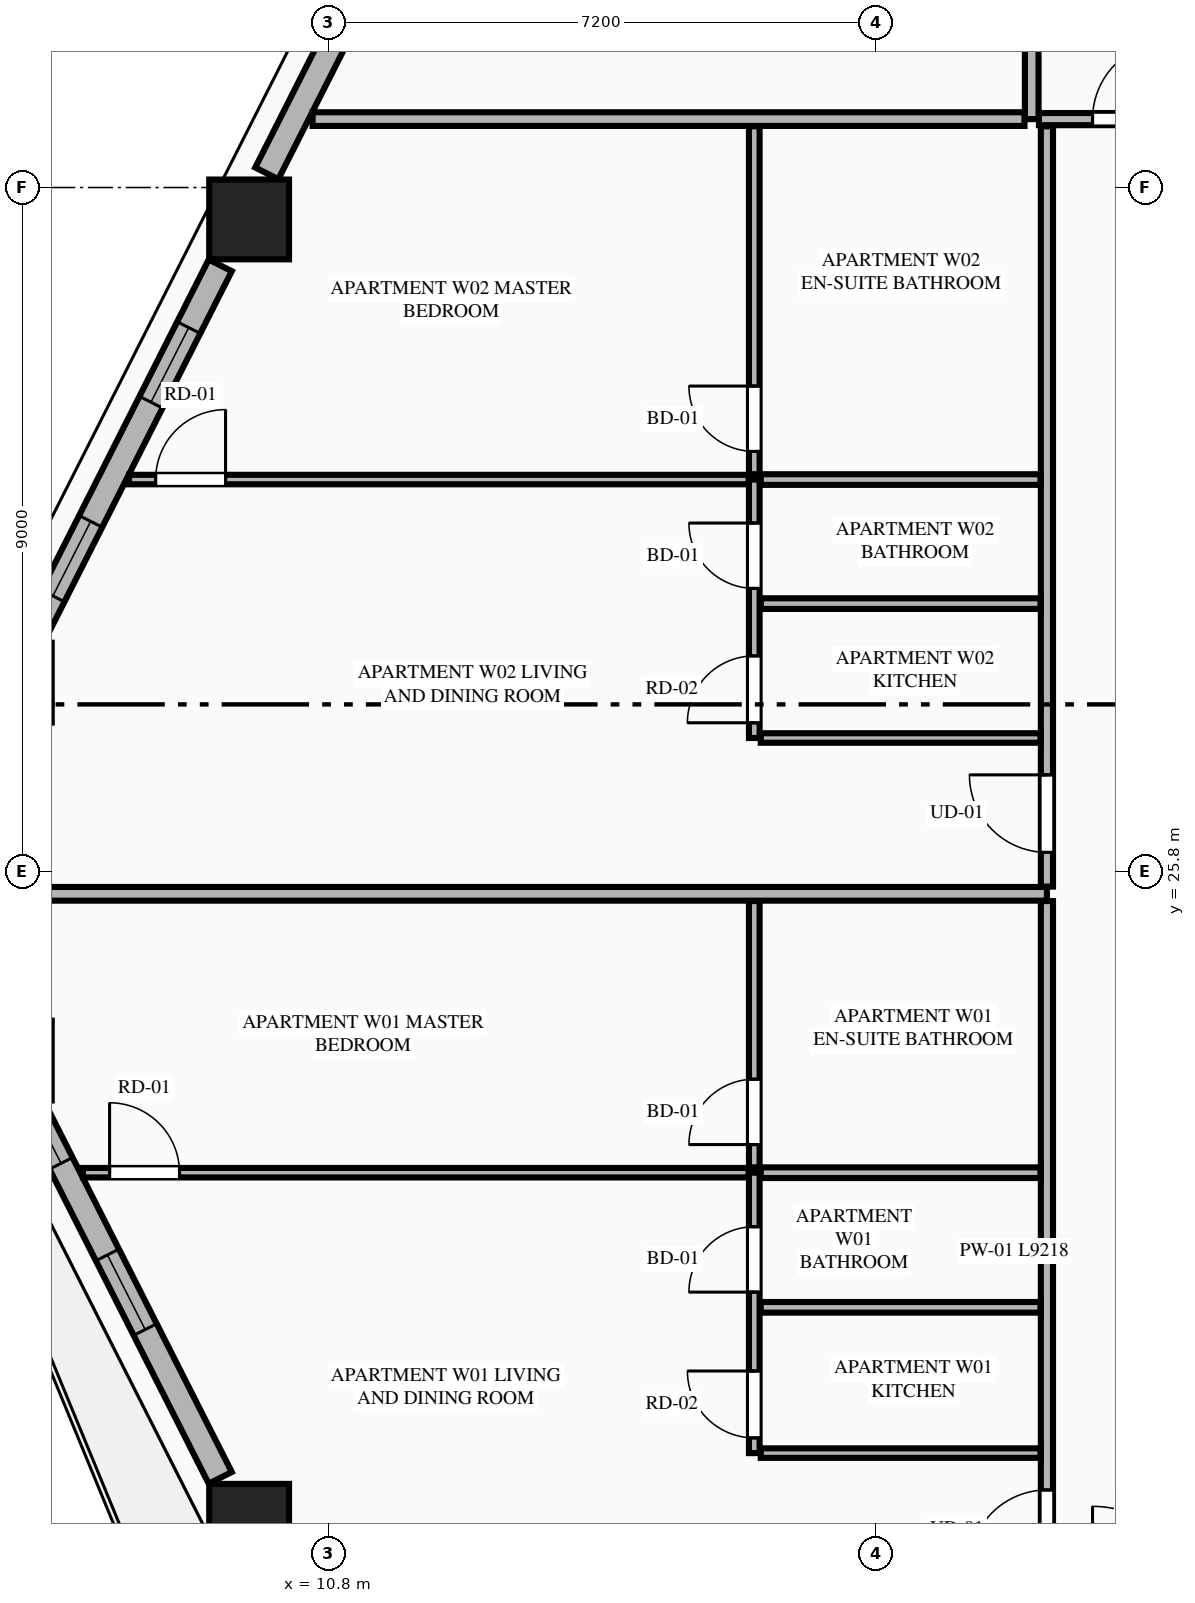
"""IFC4 building model, lengths in metres.
Left out: names, types, materials, properties, quantities, classifications, styles, units other than length and angle.
Written with IfcOpenShell. Run it as: python <this file> out.ifc"""

import sys

from ifc_helpers import new_model, si_unit, direction, frame, frame_2d, origin, origin_2d, place, context, subcontext, project, spatial, rectangle, extrude, element, fill, save


model = new_model("IFC4")
c1 = context("Model", 3, precision=1e-05, world=origin(), true_north=direction((0.0, 1.0)))
c2 = subcontext(c1, "Body", "Model", "MODEL_VIEW")
j1 = project(units=[si_unit("LENGTHUNIT", "METRE"), si_unit("PLANEANGLEUNIT", "RADIAN")], contexts=[c1])
p1 = place(None, origin())
s1 = spatial("IfcSite", under=j1, at=p1, CompositionType="ELEMENT")
p2 = place(p1, origin())
s2 = spatial("IfcBuilding", under=s1, at=p2, CompositionType="ELEMENT")
p3 = place(p2, frame((0.0, 0.0, 87.1)))
s3 = spatial("IfcBuildingStorey", under=s2, at=p3, CompositionType="ELEMENT", Elevation=87.1)
for number, where, z_axis, x_axis in (
    (1, (9.754, 34.38, 0.0), (0.0, 0.0, 1.0), (1.0, 0.0, 0.0)),
    (2, (9.754, 17.22, 0.0), (0.0, 0.0, 1.0), (1.0, 0.0, 0.0)),
):
    element("IfcColumn", number, at=place(p3, frame(where, z_axis=z_axis, x_axis=x_axis)), inside=s3, PredefinedType="COLUMN", context=c2, shape_type="SweptSolid", body=[
        extrude(rectangle(XDim=1.05, YDim=1.05, at=origin_2d()), origin(), (0.0, 0.0, 1.0), 3.55),
    ])
p4 = place(p3, frame((12.567, 40.085, 0.0), z_axis=(0.0, 0.0, 1.0), x_axis=(-0.451599886425, -0.892220568347, 0.0)))
e3 = element("IfcWall", 3, at=p4, inside=s3, PredefinedType="STANDARD", context=c2, shape_type="SweptSolid", body=[
    extrude(rectangle(XDim=5.715, YDim=0.34, at=frame_2d((2.857, 0.0))), origin(), (0.0, 0.0, 1.0), 2.787),
])
p5 = place(p4, frame((2.308, 0.0, 0.75)))
e4 = element("IfcOpeningElement", 4, at=p5, cuts=e3, PredefinedType="OPENING", context=c2, shape_type="SweptSolid", body=[
    extrude(rectangle(XDim=1.1, YDim=1.887, at=frame_2d((0.55, 0.943))), frame((0.0, 0.18, 0.0), z_axis=(0.0, -1.0, 0.0), x_axis=(1.0, 0.0, 0.0)), (0.0, 0.0, 1.0), 0.36),
])
p6 = place(p3, frame((9.374, 33.776, 0.0), z_axis=(0.0, 0.0, 1.0), x_axis=(-0.451597066012, -0.892221995901, 0.0)))
e5 = element("IfcWall", 5, at=p6, inside=s3, PredefinedType="STANDARD", context=c2, shape_type="SweptSolid", body=[
    extrude(rectangle(XDim=5.474, YDim=0.34, at=frame_2d((2.737, 0.0))), origin(), (0.0, 0.0, 1.0), 2.787),
])
p7 = place(p6, frame((0.918, 0.0, 0.75)))
e6 = element("IfcOpeningElement", 6, at=p7, cuts=e5, PredefinedType="OPENING", context=c2, shape_type="SweptSolid", body=[
    extrude(rectangle(XDim=1.1, YDim=1.887, at=frame_2d((0.55, 0.943))), frame((0.0, 0.18, 0.0), z_axis=(0.0, -1.0, 0.0), x_axis=(1.0, 0.0, 0.0)), (0.0, 0.0, 1.0), 0.36),
])
p8 = place(p6, frame((3.775, 0.0, 0.75)))
e7 = element("IfcOpeningElement", 7, at=p8, cuts=e5, PredefinedType="OPENING", context=c2, shape_type="SweptSolid", body=[
    extrude(rectangle(XDim=1.1, YDim=1.887, at=frame_2d((0.55, 0.943))), frame((0.0, 0.18, 0.0), z_axis=(0.0, -1.0, 0.0), x_axis=(1.0, 0.0, 0.0)), (0.0, 0.0, 1.0), 0.36),
])
p9 = place(p3, frame((6.902, 22.708, 0.0), z_axis=(0.0, 0.0, 1.0), x_axis=(0.451579095309, -0.892231091523, 0.0)))
e8 = element("IfcWall", 8, at=p9, inside=s3, PredefinedType="STANDARD", context=c2, shape_type="SweptSolid", body=[
    extrude(rectangle(XDim=5.474, YDim=0.34, at=frame_2d((2.737, 0.0))), origin(), (0.0, 0.0, 1.0), 2.787),
])
p10 = place(p9, frame((2.187, 0.0, 0.75)))
e9 = element("IfcOpeningElement", 9, at=p10, cuts=e8, PredefinedType="OPENING", context=c2, shape_type="SweptSolid", body=[
    extrude(rectangle(XDim=1.1, YDim=1.887, at=frame_2d((0.55, 0.943))), frame((0.0, 0.18, 0.0), z_axis=(0.0, -1.0, 0.0), x_axis=(1.0, 0.0, 0.0)), (0.0, 0.0, 1.0), 0.36),
])
p11 = place(p9, frame((0.21, 0.0, 0.75)))
e10 = element("IfcOpeningElement", 10, at=p11, cuts=e8, PredefinedType="OPENING", context=c2, shape_type="SweptSolid", body=[
    extrude(rectangle(XDim=0.626, YDim=1.887, at=frame_2d((0.313, 0.943))), frame((0.0, 0.18, 0.0), z_axis=(0.0, -1.0, 0.0), x_axis=(1.0, 0.0, 0.0)), (0.0, 0.0, 1.0), 0.36),
])
p12 = place(p3, frame((20.05, 35.7, 0.0), z_axis=(0.0, 0.0, 1.0), x_axis=(0.0, 1.0, 0.0)))
e11 = element("IfcWall", 11, at=p12, inside=s3, PredefinedType="PARTITIONING", context=c2, shape_type="SweptSolid", body=[
    extrude(rectangle(XDim=13.445, YDim=0.18, at=frame_2d((6.723, 0.0))), origin(), (0.0, 0.0, 1.0), 3.33),
])
p13 = place(p3, frame((20.145, 35.7, 0.0), z_axis=(0.0, 0.0, 1.0), x_axis=(1.0, 0.0, 0.0)))
e12 = element("IfcWall", 12, at=p13, inside=s3, PredefinedType="PARTITIONING", context=c2, shape_type="SweptSolid", body=[
    extrude(rectangle(XDim=24.51, YDim=0.16, at=frame_2d((12.255, 0.0))), origin(), (0.0, 0.0, 1.0), 3.33),
])
p14 = place(p13, frame((0.705, 0.0, 0.0)))
e13 = element("IfcOpeningElement", 13, at=p14, cuts=e12, PredefinedType="OPENING", context=c2, shape_type="SweptSolid", body=[
    extrude(rectangle(XDim=1.02, YDim=2.25, at=frame_2d((0.51, 1.125))), frame((0.0, 0.09, 0.0), z_axis=(0.0, -1.0, 0.0), x_axis=(1.0, 0.0, 0.0)), (0.0, 0.0, 1.0), 0.18),
])
p15 = place(p3, frame((10.589, 35.7, 0.0), z_axis=(0.0, 0.0, 1.0), x_axis=(1.0, 0.0, 0.0)))
e14 = element("IfcWall", 14, at=p15, inside=s3, PredefinedType="PARTITIONING", context=c2, shape_type="SweptSolid", body=[
    extrude(rectangle(XDim=9.366, YDim=0.18, at=frame_2d((4.683, 0.0))), origin(), (0.0, 0.0, 1.0), 3.33),
])
p16 = place(p3, frame((20.25, 16.195, 0.0), z_axis=(0.0, 0.0, 1.0), x_axis=(0.0, 1.0, 0.0)))
e15 = element("IfcWall", 15, at=p16, inside=s3, PredefinedType="PARTITIONING", context=c2, shape_type="SweptSolid", body=[
    extrude(rectangle(XDim=9.218, YDim=0.16, at=frame_2d((4.609, 0.0))), origin(), (0.0, 0.0, 1.0), 2.7),
])
p17 = place(p16, frame((0.45, 0.0, 0.0)))
e16 = element("IfcOpeningElement", 16, at=p17, cuts=e15, PredefinedType="OPENING", context=c2, shape_type="SweptSolid", body=[
    extrude(rectangle(XDim=1.02, YDim=2.25, at=frame_2d((0.51, 1.125))), frame((0.0, 0.09, 0.0), z_axis=(0.0, -1.0, 0.0), x_axis=(1.0, 0.0, 0.0)), (0.0, 0.0, 1.0), 0.18),
])
p18 = place(p3, frame((16.485, 18.15, 0.0), z_axis=(0.0, 0.0, 1.0), x_axis=(1.0, 0.0, 0.0)))
e17 = element("IfcWall", 17, at=p18, inside=s3, PredefinedType="PARTITIONING", context=c2, shape_type="SweptSolid", body=[
    extrude(rectangle(XDim=3.68, YDim=0.125, at=frame_2d((1.84, 0.0))), origin(), (0.0, 0.0, 1.0), 2.7),
])
p19 = place(p3, frame((16.4, 18.15, 0.0), z_axis=(0.0, 0.0, 1.0), x_axis=(0.0, 1.0, 0.0)))
e18 = element("IfcWall", 18, at=p19, inside=s3, PredefinedType="PLUMBINGWALL", context=c2, shape_type="SweptSolid", body=[
    extrude(rectangle(XDim=3.689, YDim=0.14, at=frame_2d((1.845, 0.0))), origin(), (0.0, 0.0, 1.0), 3.33),
])
p20 = place(p19, frame((0.2, 0.0, 0.0)))
e19 = element("IfcOpeningElement", 19, at=p20, cuts=e18, PredefinedType="OPENING", context=c2, shape_type="SweptSolid", body=[
    extrude(rectangle(XDim=0.88, YDim=2.15, at=frame_2d((0.44, 1.075))), frame((0.0, 0.08, 0.0), z_axis=(0.0, -1.0, 0.0), x_axis=(1.0, 0.0, 0.0)), (0.0, 0.0, 1.0), 0.16),
])
p21 = place(p19, frame((2.118, 0.0, 0.0)))
e20 = element("IfcOpeningElement", 20, at=p21, cuts=e18, PredefinedType="OPENING", context=c2, shape_type="SweptSolid", body=[
    extrude(rectangle(XDim=0.86, YDim=2.1, at=frame_2d((0.43, 1.05))), frame((0.0, 0.08, 0.0), z_axis=(0.0, -1.0, 0.0), x_axis=(1.0, 0.0, 0.0)), (0.0, 0.0, 1.0), 0.16),
])
p22 = place(p3, frame((16.4, 21.909, 0.0), z_axis=(0.0, 0.0, 1.0), x_axis=(0.0, 1.0, 0.0)))
e21 = element("IfcWall", 21, at=p22, inside=s3, PredefinedType="PLUMBINGWALL", context=c2, shape_type="SweptSolid", body=[
    extrude(rectangle(XDim=3.504, YDim=0.14, at=frame_2d((1.752, 0.0))), origin(), (0.0, 0.0, 1.0), 3.33),
])
p23 = place(p22, frame((0.3, 0.0, 0.0)))
e22 = element("IfcOpeningElement", 22, at=p23, cuts=e21, PredefinedType="OPENING", context=c2, shape_type="SweptSolid", body=[
    extrude(rectangle(XDim=0.86, YDim=2.1, at=frame_2d((0.43, 1.05))), frame((0.0, 0.08, 0.0), z_axis=(0.0, -1.0, 0.0), x_axis=(1.0, 0.0, 0.0)), (0.0, 0.0, 1.0), 0.16),
])
p24 = place(p3, frame((16.485, 21.839, 0.0), z_axis=(0.0, 0.0, 1.0), x_axis=(1.0, 0.0, 0.0)))
e23 = element("IfcWall", 23, at=p24, inside=s3, PredefinedType="PLUMBINGWALL", context=c2, shape_type="SweptSolid", body=[
    extrude(rectangle(XDim=3.68, YDim=0.14, at=frame_2d((1.84, 0.0))), origin(), (0.0, 0.0, 1.0), 3.33),
])
p25 = place(p3, frame((7.568, 21.839, 0.0), z_axis=(0.0, 0.0, 1.0), x_axis=(1.0, 0.0, 0.0)))
e24 = element("IfcWall", 24, at=p25, inside=s3, PredefinedType="PARTITIONING", context=c2, shape_type="SweptSolid", body=[
    extrude(rectangle(XDim=8.757, YDim=0.125, at=frame_2d((4.378, 0.0))), origin(), (0.0, 0.0, 1.0), 3.33),
])
p26 = place(p25, frame((0.35, 0.0, 0.0)))
e25 = element("IfcOpeningElement", 25, at=p26, cuts=e24, PredefinedType="OPENING", context=c2, shape_type="SweptSolid", body=[
    extrude(rectangle(XDim=0.92, YDim=2.15, at=frame_2d((0.46, 1.075))), frame((0.0, 0.073, 0.0), z_axis=(0.0, -1.0, 0.0), x_axis=(1.0, 0.0, 0.0)), (0.0, 0.0, 1.0), 0.145),
])
p27 = place(p3, frame((16.485, 20.068, 0.0), z_axis=(0.0, 0.0, 1.0), x_axis=(1.0, 0.0, 0.0)))
e26 = element("IfcWall", 26, at=p27, inside=s3, PredefinedType="PLUMBINGWALL", context=c2, shape_type="SweptSolid", body=[
    extrude(rectangle(XDim=3.68, YDim=0.14, at=frame_2d((1.84, 0.0))), origin(), (0.0, 0.0, 1.0), 3.33),
])
p28 = place(p3, frame((6.087, 25.508, 0.0), z_axis=(0.0, 0.0, 1.0), x_axis=(1.0, 0.0, 0.0)))
e27 = element("IfcWall", 27, at=p28, inside=s3, PredefinedType="PARTITIONING", context=c2, shape_type="SweptSolid", body=[
    extrude(rectangle(XDim=14.163, YDim=0.18, at=frame_2d((7.082, 0.0))), origin(), (0.0, 0.0, 1.0), 3.33),
])
p29 = place(p3, frame((20.25, 25.603, 0.0), z_axis=(0.0, 0.0, 1.0), x_axis=(0.0, 1.0, 0.0)))
e28 = element("IfcWall", 28, at=p29, inside=s3, PredefinedType="PARTITIONING", context=c2, shape_type="SweptSolid", body=[
    extrude(rectangle(XDim=10.002, YDim=0.16, at=frame_2d((5.001, 0.0))), origin(), (0.0, 0.0, 1.0), 2.7),
])
p30 = place(p29, frame((0.45, 0.0, 0.0)))
e29 = element("IfcOpeningElement", 29, at=p30, cuts=e28, PredefinedType="OPENING", context=c2, shape_type="SweptSolid", body=[
    extrude(rectangle(XDim=1.02, YDim=2.25, at=frame_2d((0.51, 1.125))), frame((0.0, 0.09, 0.0), z_axis=(0.0, -1.0, 0.0), x_axis=(1.0, 0.0, 0.0)), (0.0, 0.0, 1.0), 0.18),
])
p31 = place(p3, frame((16.485, 27.558, 0.0), z_axis=(0.0, 0.0, 1.0), x_axis=(1.0, 0.0, 0.0)))
e30 = element("IfcWall", 30, at=p31, inside=s3, PredefinedType="PARTITIONING", context=c2, shape_type="SweptSolid", body=[
    extrude(rectangle(XDim=3.68, YDim=0.125, at=frame_2d((1.84, 0.0))), origin(), (0.0, 0.0, 1.0), 3.33),
])
p32 = place(p3, frame((16.4, 27.558, 0.0), z_axis=(0.0, 0.0, 1.0), x_axis=(0.0, 1.0, 0.0)))
e31 = element("IfcWall", 31, at=p32, inside=s3, PredefinedType="PLUMBINGWALL", context=c2, shape_type="SweptSolid", body=[
    extrude(rectangle(XDim=3.4, YDim=0.14, at=frame_2d((1.7, 0.0))), origin(), (0.0, 0.0, 1.0), 3.33),
])
p33 = place(p32, frame((0.2, 0.0, 0.0)))
e32 = element("IfcOpeningElement", 32, at=p33, cuts=e31, PredefinedType="OPENING", context=c2, shape_type="SweptSolid", body=[
    extrude(rectangle(XDim=0.88, YDim=2.15, at=frame_2d((0.44, 1.075))), frame((0.0, 0.08, 0.0), z_axis=(0.0, -1.0, 0.0), x_axis=(1.0, 0.0, 0.0)), (0.0, 0.0, 1.0), 0.16),
])
p34 = place(p32, frame((1.968, 0.0, 0.0)))
e33 = element("IfcOpeningElement", 33, at=p34, cuts=e31, PredefinedType="OPENING", context=c2, shape_type="SweptSolid", body=[
    extrude(rectangle(XDim=0.86, YDim=2.1, at=frame_2d((0.43, 1.05))), frame((0.0, 0.08, 0.0), z_axis=(0.0, -1.0, 0.0), x_axis=(1.0, 0.0, 0.0)), (0.0, 0.0, 1.0), 0.16),
])
p35 = place(p3, frame((16.4, 31.028, 0.0), z_axis=(0.0, 0.0, 1.0), x_axis=(0.0, 1.0, 0.0)))
e34 = element("IfcWall", 34, at=p35, inside=s3, PredefinedType="PLUMBINGWALL", context=c2, shape_type="SweptSolid", body=[
    extrude(rectangle(XDim=4.577, YDim=0.14, at=frame_2d((2.289, 0.0))), origin(), (0.0, 0.0, 1.0), 3.33),
])
p36 = place(p35, frame((0.3, 0.0, 0.0)))
e35 = element("IfcOpeningElement", 35, at=p36, cuts=e34, PredefinedType="OPENING", context=c2, shape_type="SweptSolid", body=[
    extrude(rectangle(XDim=0.86, YDim=2.1, at=frame_2d((0.43, 1.05))), frame((0.0, 0.08, 0.0), z_axis=(0.0, -1.0, 0.0), x_axis=(1.0, 0.0, 0.0)), (0.0, 0.0, 1.0), 0.16),
])
p37 = place(p3, frame((16.485, 30.958, 0.0), z_axis=(0.0, 0.0, 1.0), x_axis=(1.0, 0.0, 0.0)))
e36 = element("IfcWall", 36, at=p37, inside=s3, PredefinedType="PLUMBINGWALL", context=c2, shape_type="SweptSolid", body=[
    extrude(rectangle(XDim=3.68, YDim=0.14, at=frame_2d((1.84, 0.0))), origin(), (0.0, 0.0, 1.0), 3.33),
])
p38 = place(p3, frame((8.174, 30.958, 0.0), z_axis=(0.0, 0.0, 1.0), x_axis=(1.0, 0.0, 0.0)))
e37 = element("IfcWall", 37, at=p38, inside=s3, PredefinedType="PARTITIONING", context=c2, shape_type="SweptSolid", body=[
    extrude(rectangle(XDim=8.151, YDim=0.125, at=frame_2d((4.075, 0.0))), origin(), (0.0, 0.0, 1.0), 3.33),
])
p39 = place(p38, frame((0.35, 0.0, 0.0)))
e38 = element("IfcOpeningElement", 38, at=p39, cuts=e37, PredefinedType="OPENING", context=c2, shape_type="SweptSolid", body=[
    extrude(rectangle(XDim=0.92, YDim=2.15, at=frame_2d((0.46, 1.075))), frame((0.0, 0.073, 0.0), z_axis=(0.0, -1.0, 0.0), x_axis=(1.0, 0.0, 0.0)), (0.0, 0.0, 1.0), 0.145),
])
p40 = place(p3, frame((16.485, 29.326, 0.0), z_axis=(0.0, 0.0, 1.0), x_axis=(1.0, 0.0, 0.0)))
e39 = element("IfcWall", 39, at=p40, inside=s3, PredefinedType="PLUMBINGWALL", context=c2, shape_type="SweptSolid", body=[
    extrude(rectangle(XDim=3.68, YDim=0.14, at=frame_2d((1.84, 0.0))), origin(), (0.0, 0.0, 1.0), 3.33),
])
p41 = place(p7, origin())
e40 = element("IfcWindow", 40, at=p41, inside=s3, PartitioningType="SINGLE_PANEL", PredefinedType="WINDOW", context=c2, shape_type="SweptSolid", body=[
    extrude(rectangle(XDim=1.1, YDim=1.887, at=frame_2d((0.55, 0.943))), frame((0.0, 0.03, 0.0), z_axis=(0.0, -1.0, 0.0), x_axis=(1.0, 0.0, 0.0)), (0.0, 0.0, 1.0), 0.06),
])
fill(e6, e40)
p42 = place(p10, origin())
e41 = element("IfcWindow", 41, at=p42, inside=s3, PartitioningType="SINGLE_PANEL", PredefinedType="WINDOW", context=c2, shape_type="SweptSolid", body=[
    extrude(rectangle(XDim=1.1, YDim=1.887, at=frame_2d((0.55, 0.943))), frame((0.0, 0.03, 0.0), z_axis=(0.0, -1.0, 0.0), x_axis=(1.0, 0.0, 0.0)), (0.0, 0.0, 1.0), 0.06),
])
fill(e9, e41)
p43 = place(p14, origin())
e42 = element("IfcDoor", 42, at=p43, inside=s3, OperationType="SINGLE_SWING_RIGHT", PredefinedType="DOOR", context=c2, shape_type="SweptSolid", body=[
    extrude(rectangle(XDim=1.02, YDim=2.25, at=frame_2d((0.51, 1.125))), frame((0.0, 0.025, 0.0), z_axis=(0.0, -1.0, 0.0), x_axis=(1.0, 0.0, 0.0)), (0.0, 0.0, 1.0), 0.05),
])
fill(e13, e42)
p44 = place(p20, origin())
e43 = element("IfcDoor", 43, at=p44, inside=s3, OperationType="SINGLE_SWING_RIGHT", PredefinedType="DOOR", context=c2, shape_type="SweptSolid", body=[
    extrude(rectangle(XDim=0.88, YDim=2.15, at=frame_2d((0.44, 1.075))), frame((0.0, 0.025, 0.0), z_axis=(0.0, -1.0, 0.0), x_axis=(1.0, 0.0, 0.0)), (0.0, 0.0, 1.0), 0.05),
])
fill(e19, e43)
p45 = place(p21, origin())
e44 = element("IfcDoor", 44, at=p45, inside=s3, OperationType="SINGLE_SWING_LEFT", PredefinedType="DOOR", context=c2, shape_type="SweptSolid", body=[
    extrude(rectangle(XDim=0.86, YDim=2.1, at=frame_2d((0.43, 1.05))), frame((0.0, 0.025, 0.0), z_axis=(0.0, -1.0, 0.0), x_axis=(1.0, 0.0, 0.0)), (0.0, 0.0, 1.0), 0.05),
])
fill(e20, e44)
p46 = place(p23, origin())
e45 = element("IfcDoor", 45, at=p46, inside=s3, OperationType="SINGLE_SWING_LEFT", PredefinedType="DOOR", context=c2, shape_type="SweptSolid", body=[
    extrude(rectangle(XDim=0.86, YDim=2.1, at=frame_2d((0.43, 1.05))), frame((0.0, 0.025, 0.0), z_axis=(0.0, -1.0, 0.0), x_axis=(1.0, 0.0, 0.0)), (0.0, 0.0, 1.0), 0.05),
])
fill(e22, e45)
p47 = place(p17, origin())
e46 = element("IfcDoor", 46, at=p47, inside=s3, OperationType="SINGLE_SWING_LEFT", PredefinedType="DOOR", context=c2, shape_type="SweptSolid", body=[
    extrude(rectangle(XDim=1.02, YDim=2.25, at=frame_2d((0.51, 1.125))), frame((0.0, 0.025, 0.0), z_axis=(0.0, -1.0, 0.0), x_axis=(1.0, 0.0, 0.0)), (0.0, 0.0, 1.0), 0.05),
])
fill(e16, e46)
p48 = place(p26, origin())
e47 = element("IfcDoor", 47, at=p48, inside=s3, OperationType="SINGLE_SWING_LEFT", PredefinedType="DOOR", context=c2, shape_type="SweptSolid", body=[
    extrude(rectangle(XDim=0.92, YDim=2.15, at=frame_2d((0.46, 1.075))), frame((0.0, 0.025, 0.0), z_axis=(0.0, -1.0, 0.0), x_axis=(1.0, 0.0, 0.0)), (0.0, 0.0, 1.0), 0.05),
])
fill(e25, e47)
p49 = place(p33, origin())
e48 = element("IfcDoor", 48, at=p49, inside=s3, OperationType="SINGLE_SWING_LEFT", PredefinedType="DOOR", context=c2, shape_type="SweptSolid", body=[
    extrude(rectangle(XDim=0.88, YDim=2.15, at=frame_2d((0.44, 1.075))), frame((0.0, 0.025, 0.0), z_axis=(0.0, -1.0, 0.0), x_axis=(1.0, 0.0, 0.0)), (0.0, 0.0, 1.0), 0.05),
])
fill(e32, e48)
p50 = place(p34, origin())
e49 = element("IfcDoor", 49, at=p50, inside=s3, OperationType="SINGLE_SWING_RIGHT", PredefinedType="DOOR", context=c2, shape_type="SweptSolid", body=[
    extrude(rectangle(XDim=0.86, YDim=2.1, at=frame_2d((0.43, 1.05))), frame((0.0, 0.025, 0.0), z_axis=(0.0, -1.0, 0.0), x_axis=(1.0, 0.0, 0.0)), (0.0, 0.0, 1.0), 0.05),
])
fill(e33, e49)
p51 = place(p36, origin())
e50 = element("IfcDoor", 50, at=p51, inside=s3, OperationType="SINGLE_SWING_RIGHT", PredefinedType="DOOR", context=c2, shape_type="SweptSolid", body=[
    extrude(rectangle(XDim=0.86, YDim=2.1, at=frame_2d((0.43, 1.05))), frame((0.0, 0.025, 0.0), z_axis=(0.0, -1.0, 0.0), x_axis=(1.0, 0.0, 0.0)), (0.0, 0.0, 1.0), 0.05),
])
fill(e35, e50)
p52 = place(p30, origin())
e51 = element("IfcDoor", 51, at=p52, inside=s3, OperationType="SINGLE_SWING_RIGHT", PredefinedType="DOOR", context=c2, shape_type="SweptSolid", body=[
    extrude(rectangle(XDim=1.02, YDim=2.25, at=frame_2d((0.51, 1.125))), frame((0.0, 0.025, 0.0), z_axis=(0.0, -1.0, 0.0), x_axis=(1.0, 0.0, 0.0)), (0.0, 0.0, 1.0), 0.05),
])
fill(e29, e51)
p53 = place(p39, origin())
e52 = element("IfcDoor", 52, at=p53, inside=s3, OperationType="SINGLE_SWING_RIGHT", PredefinedType="DOOR", context=c2, shape_type="SweptSolid", body=[
    extrude(rectangle(XDim=0.92, YDim=2.15, at=frame_2d((0.46, 1.075))), frame((0.0, 0.025, 0.0), z_axis=(0.0, -1.0, 0.0), x_axis=(1.0, 0.0, 0.0)), (0.0, 0.0, 1.0), 0.05),
])
fill(e38, e52)
p54 = place(p8, origin())
e53 = element("IfcWindow", 53, at=p54, inside=s3, PartitioningType="SINGLE_PANEL", PredefinedType="WINDOW", context=c2, shape_type="SweptSolid", body=[
    extrude(rectangle(XDim=1.1, YDim=1.887, at=frame_2d((0.55, 0.943))), frame((0.0, 0.03, 0.0), z_axis=(0.0, -1.0, 0.0), x_axis=(1.0, 0.0, 0.0)), (0.0, 0.0, 1.0), 0.06),
])
fill(e7, e53)
p55 = place(p11, origin())
e54 = element("IfcWindow", 54, at=p55, inside=s3, PartitioningType="SINGLE_PANEL", PredefinedType="WINDOW", context=c2, shape_type="SweptSolid", body=[
    extrude(rectangle(XDim=0.626, YDim=1.887, at=frame_2d((0.313, 0.943))), frame((0.0, 0.03, 0.0), z_axis=(0.0, -1.0, 0.0), x_axis=(1.0, 0.0, 0.0)), (0.0, 0.0, 1.0), 0.06),
])
fill(e10, e54)
save(model, sys.argv[1])
